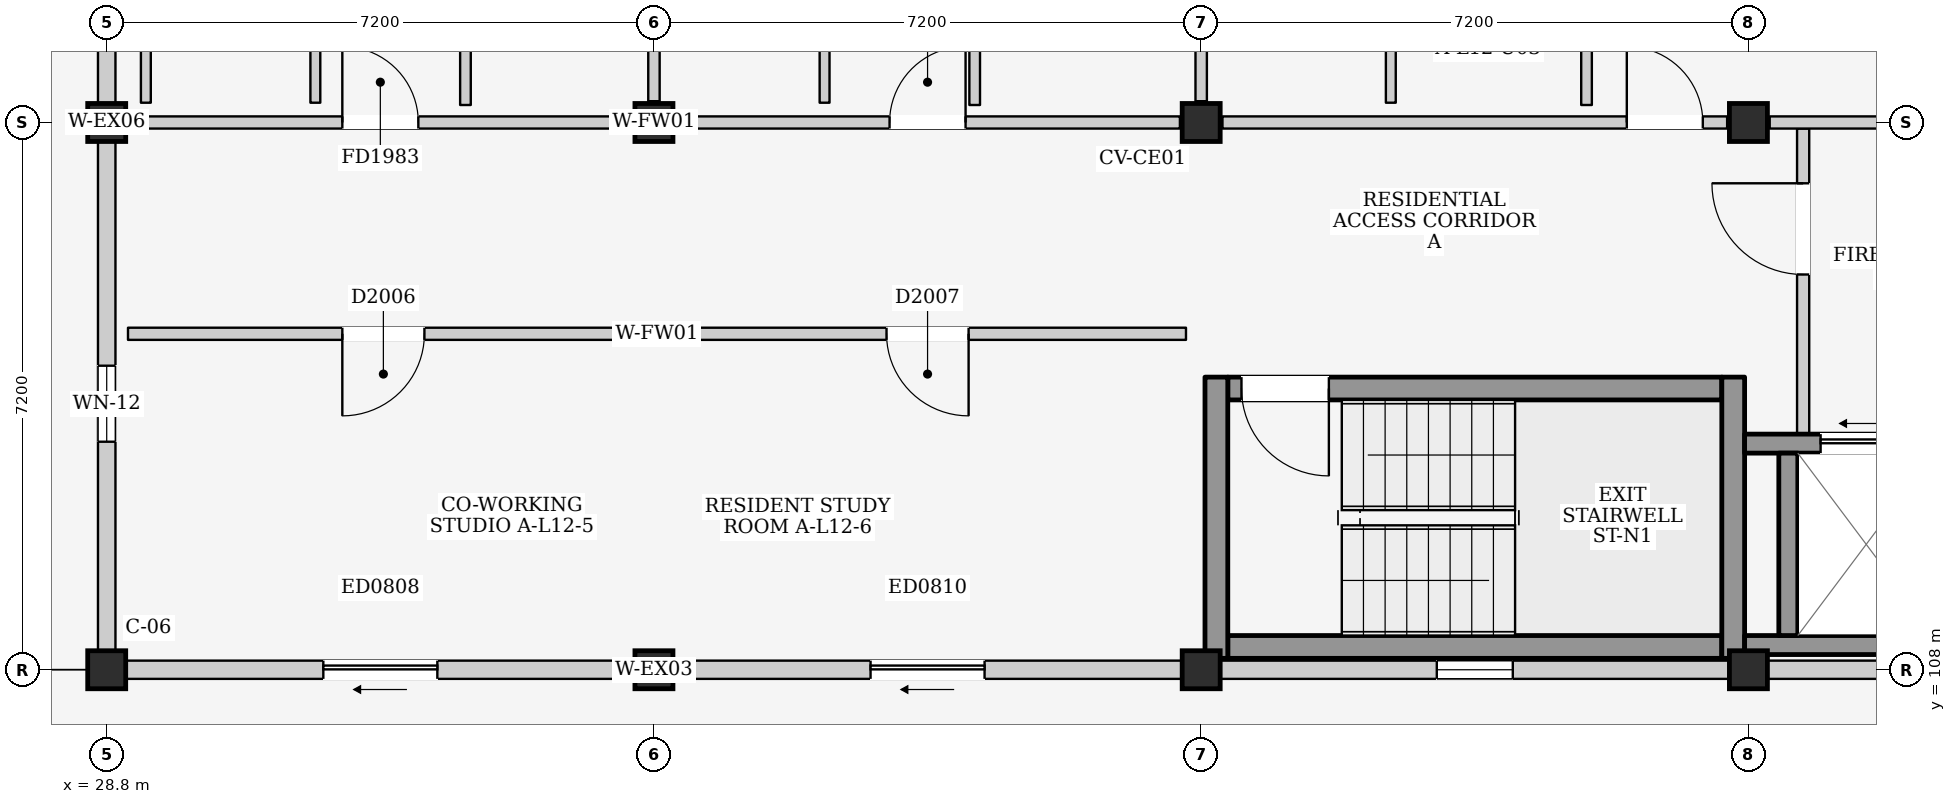
"""IFC4 building model, lengths in metres.
Left out: names, types, materials, properties, quantities, classifications, styles, units other than length and angle.
Written with IfcOpenShell. Run it as: python <this file> out.ifc"""

import sys

from ifc_helpers import new_model, si_unit, direction, frame, frame_2d, origin, origin_2d, place, context, subcontext, project, spatial, rectangle, extrude, element, fill, save


model = new_model("IFC4")
c1 = context("Model", 3, precision=1e-05, world=origin(), true_north=direction((0.0, 1.0)))
c2 = subcontext(c1, "Body", "Model", "MODEL_VIEW")
j1 = project(units=[si_unit("LENGTHUNIT", "METRE"), si_unit("PLANEANGLEUNIT", "RADIAN")], contexts=[c1])
p1 = place(None, origin())
s1 = spatial("IfcSite", under=j1, at=p1, CompositionType="ELEMENT")
p2 = place(p1, origin())
s2 = spatial("IfcBuilding", under=s1, at=p2, CompositionType="ELEMENT")
p3 = place(p2, frame((0.0, 0.0, 41.2)))
s3 = spatial("IfcBuildingStorey", under=s2, at=p3, CompositionType="ELEMENT", Elevation=41.2)
for number, where, z_axis, x_axis in (
    (1, (28.8, 108.0, 0.0), (0.0, 0.0, 1.0), (1.0, 0.0, 0.0)),
    (2, (28.8, 115.2, 0.0), (0.0, 0.0, 1.0), (1.0, 0.0, 0.0)),
    (3, (36.0, 108.0, 0.0), (0.0, 0.0, 1.0), (1.0, 0.0, 0.0)),
    (4, (36.0, 115.2, 0.0), (0.0, 0.0, 1.0), (1.0, 0.0, 0.0)),
    (5, (43.2, 108.0, 0.0), (0.0, 0.0, 1.0), (1.0, 0.0, 0.0)),
    (6, (43.2, 115.2, 0.0), (0.0, 0.0, 1.0), (1.0, 0.0, 0.0)),
    (7, (50.4, 108.0, 0.0), (0.0, 0.0, 1.0), (1.0, 0.0, 0.0)),
    (8, (50.4, 115.2, 0.0), (0.0, 0.0, 1.0), (1.0, 0.0, 0.0)),
):
    element("IfcColumn", number, at=place(p3, frame(where, z_axis=z_axis, x_axis=x_axis)), inside=s3, PredefinedType="COLUMN", context=c2, shape_type="SweptSolid", body=[
        extrude(rectangle(XDim=0.5, YDim=0.5, at=origin_2d()), origin(), (0.0, 0.0, 1.0), 3.2),
    ])
p4 = place(p3, frame((29.05, 108.0, 0.0), z_axis=(0.0, 0.0, 1.0), x_axis=(1.0, 0.0, 0.0)))
e9 = element("IfcWall", 9, at=p4, inside=s3, PredefinedType="ELEMENTEDWALL", context=c2, shape_type="SweptSolid", body=[
    extrude(rectangle(XDim=6.7, YDim=0.24, at=frame_2d((3.35, 0.0))), origin(), (0.0, 0.0, 1.0), 2.285),
])
p5 = place(p4, frame((2.6, 0.0, 0.0)))
e10 = element("IfcOpeningElement", 10, at=p5, cuts=e9, PredefinedType="OPENING", context=c2, shape_type="SweptSolid", body=[
    extrude(rectangle(XDim=1.5, YDim=2.12, at=frame_2d((0.75, 1.06))), frame((0.0, 0.135, 0.0), z_axis=(0.0, -1.0, 0.0), x_axis=(1.0, 0.0, 0.0)), (0.0, 0.0, 1.0), 0.27),
])
p6 = place(p3, frame((36.25, 108.0, 0.0), z_axis=(0.0, 0.0, 1.0), x_axis=(1.0, 0.0, 0.0)))
e11 = element("IfcWall", 11, at=p6, inside=s3, PredefinedType="ELEMENTEDWALL", context=c2, shape_type="SweptSolid", body=[
    extrude(rectangle(XDim=6.7, YDim=0.24, at=frame_2d((3.35, 0.0))), origin(), (0.0, 0.0, 1.0), 2.285),
])
p7 = place(p6, frame((2.6, 0.0, 0.0)))
e12 = element("IfcOpeningElement", 12, at=p7, cuts=e11, PredefinedType="OPENING", context=c2, shape_type="SweptSolid", body=[
    extrude(rectangle(XDim=1.5, YDim=2.12, at=frame_2d((0.75, 1.06))), frame((0.0, 0.135, 0.0), z_axis=(0.0, -1.0, 0.0), x_axis=(1.0, 0.0, 0.0)), (0.0, 0.0, 1.0), 0.27),
])
p8 = place(p3, frame((43.45, 108.0, 0.0), z_axis=(0.0, 0.0, 1.0), x_axis=(1.0, 0.0, 0.0)))
e13 = element("IfcWall", 13, at=p8, inside=s3, PredefinedType="ELEMENTEDWALL", context=c2, shape_type="SweptSolid", body=[
    extrude(rectangle(XDim=6.7, YDim=0.24, at=frame_2d((3.35, 0.0))), origin(), (0.0, 0.0, 1.0), 2.285),
])
p9 = place(p8, frame((2.85, 0.0, 1.2)))
e14 = element("IfcOpeningElement", 14, at=p9, cuts=e13, PredefinedType="OPENING", context=c2, shape_type="SweptSolid", body=[
    extrude(rectangle(XDim=1.0, YDim=0.9, at=frame_2d((0.5, 0.45))), frame((0.0, 0.135, 0.0), z_axis=(0.0, -1.0, 0.0), x_axis=(1.0, 0.0, 0.0)), (0.0, 0.0, 1.0), 0.27),
])
p10 = place(p3, frame((50.65, 108.0, 0.0), z_axis=(0.0, 0.0, 1.0), x_axis=(1.0, 0.0, 0.0)))
e15 = element("IfcWall", 15, at=p10, inside=s3, PredefinedType="ELEMENTEDWALL", context=c2, shape_type="SweptSolid", body=[
    extrude(rectangle(XDim=6.7, YDim=0.24, at=frame_2d((3.35, 0.0))), origin(), (0.0, 0.0, 1.0), 2.285),
])
p11 = place(p10, frame((2.85, 0.0, 1.2)))
e16 = element("IfcOpeningElement", 16, at=p11, cuts=e15, PredefinedType="OPENING", context=c2, shape_type="SweptSolid", body=[
    extrude(rectangle(XDim=1.0, YDim=0.9, at=frame_2d((0.5, 0.45))), frame((0.0, 0.135, 0.0), z_axis=(0.0, -1.0, 0.0), x_axis=(1.0, 0.0, 0.0)), (0.0, 0.0, 1.0), 0.27),
])
p12 = place(p3, frame((28.8, 108.25, 0.0), z_axis=(0.0, 0.0, 1.0), x_axis=(0.0, 1.0, 0.0)))
e17 = element("IfcWall", 17, at=p12, inside=s3, PredefinedType="ELEMENTEDWALL", context=c2, shape_type="SweptSolid", body=[
    extrude(rectangle(XDim=6.7, YDim=0.23, at=frame_2d((3.35, 0.0))), origin(), (0.0, 0.0, 1.0), 2.435),
])
p13 = place(p12, frame((2.75, 0.0, 1.1)))
e18 = element("IfcOpeningElement", 18, at=p13, cuts=e17, PredefinedType="OPENING", context=c2, shape_type="SweptSolid", body=[
    extrude(rectangle(XDim=1.0, YDim=0.9, at=frame_2d((0.5, 0.45))), frame((0.0, 0.13, 0.0), z_axis=(0.0, -1.0, 0.0), x_axis=(1.0, 0.0, 0.0)), (0.0, 0.0, 1.0), 0.26),
])
p14 = place(p3, frame((28.8, 115.45, 0.0), z_axis=(0.0, 0.0, 1.0), x_axis=(0.0, 1.0, 0.0)))
e19 = element("IfcWall", 19, at=p14, inside=s3, PredefinedType="ELEMENTEDWALL", context=c2, shape_type="SweptSolid", body=[
    extrude(rectangle(XDim=6.7, YDim=0.23, at=frame_2d((3.35, 0.0))), origin(), (0.0, 0.0, 1.0), 2.435),
])
p15 = place(p14, frame((3.6, 0.0, 0.0)))
e20 = element("IfcOpeningElement", 20, at=p15, cuts=e19, PredefinedType="OPENING", context=c2, shape_type="SweptSolid", body=[
    extrude(rectangle(XDim=1.08, YDim=2.12, at=frame_2d((0.54, 1.06))), frame((0.0, 0.13, 0.0), z_axis=(0.0, -1.0, 0.0), x_axis=(1.0, 0.0, 0.0)), (0.0, 0.0, 1.0), 0.26),
])
p16 = place(p3, frame((43.55, 108.3, 0.0), z_axis=(0.0, 0.0, 1.0), x_axis=(1.0, 0.0, 0.0)))
e21 = element("IfcWall", 21, at=p16, inside=s3, PredefinedType="SHEAR", context=c2, shape_type="SweptSolid", body=[
    extrude(rectangle(XDim=6.5, YDim=0.3, at=frame_2d((3.25, 0.0))), origin(), (0.0, 0.0, 1.0), 2.95),
])
p17 = place(p3, frame((43.55, 111.7, 0.0), z_axis=(0.0, 0.0, 1.0), x_axis=(1.0, 0.0, 0.0)))
e22 = element("IfcWall", 22, at=p17, inside=s3, PredefinedType="SHEAR", context=c2, shape_type="SweptSolid", body=[
    extrude(rectangle(XDim=6.5, YDim=0.3, at=frame_2d((3.25, 0.0))), origin(), (0.0, 0.0, 1.0), 2.95),
])
p18 = place(p17, frame((0.18, 0.0, 0.0)))
e23 = element("IfcOpeningElement", 23, at=p18, cuts=e22, PredefinedType="OPENING", context=c2, shape_type="SweptSolid", body=[
    extrude(rectangle(XDim=1.15, YDim=2.2, at=frame_2d((0.575, 1.1))), frame((0.0, 0.165, 0.0), z_axis=(0.0, -1.0, 0.0), x_axis=(1.0, 0.0, 0.0)), (0.0, 0.0, 1.0), 0.33),
])
for number, where, z_axis, x_axis in (
    (24, (43.4, 108.15, 0.0), (0.0, 0.0, 1.0), (0.0, 1.0, 0.0)),
    (25, (50.2, 108.15, 0.0), (0.0, 0.0, 1.0), (0.0, 1.0, 0.0)),
):
    element("IfcWall", number, at=place(p3, frame(where, z_axis=z_axis, x_axis=x_axis)), inside=s3, PredefinedType="SHEAR", context=c2, shape_type="SweptSolid", body=[
        extrude(rectangle(XDim=3.7, YDim=0.3, at=frame_2d((1.85, 0.0))), origin(), (0.0, 0.0, 1.0), 2.95),
    ])
p19 = place(p3, frame((51.12, 111.1, 0.0), z_axis=(0.0, 0.0, 1.0), x_axis=(0.0, 1.0, 0.0)))
e26 = element("IfcWall", 26, at=p19, inside=s3, PredefinedType="PARTITIONING", context=c2, shape_type="SweptSolid", body=[
    extrude(rectangle(XDim=4.02, YDim=0.16, at=frame_2d((2.01, 0.0))), origin(), (0.0, 0.0, 1.0), 2.95),
])
p20 = place(p19, frame((2.1, 0.0, 0.0)))
e27 = element("IfcOpeningElement", 27, at=p20, cuts=e26, PredefinedType="OPENING", context=c2, shape_type="SweptSolid", body=[
    extrude(rectangle(XDim=1.2, YDim=2.2, at=frame_2d((0.6, 1.1))), frame((0.0, 0.095, 0.0), z_axis=(0.0, -1.0, 0.0), x_axis=(1.0, 0.0, 0.0)), (0.0, 0.0, 1.0), 0.19),
])
p21 = place(p3, frame((50.35, 108.325, 0.0), z_axis=(0.0, 0.0, 1.0), x_axis=(1.0, 0.0, 0.0)))
e28 = element("IfcWall", 28, at=p21, inside=s3, PredefinedType="SHEAR", context=c2, shape_type="SweptSolid", body=[
    extrude(rectangle(XDim=2.675, YDim=0.25, at=frame_2d((1.337, 0.0))), origin(), (0.0, 0.0, 1.0), 2.95),
])
p22 = place(p3, frame((50.35, 110.975, 0.0), z_axis=(0.0, 0.0, 1.0), x_axis=(1.0, 0.0, 0.0)))
e29 = element("IfcWall", 29, at=p22, inside=s3, PredefinedType="SHEAR", context=c2, shape_type="SweptSolid", body=[
    extrude(rectangle(XDim=2.675, YDim=0.25, at=frame_2d((1.337, 0.0))), origin(), (0.0, 0.0, 1.0), 2.95),
])
p23 = place(p22, frame((1.0, 0.0, 0.0)))
e30 = element("IfcOpeningElement", 30, at=p23, cuts=e29, PredefinedType="OPENING", context=c2, shape_type="SweptSolid", body=[
    extrude(rectangle(XDim=1.2, YDim=2.25, at=frame_2d((0.6, 1.125))), frame((0.0, 0.14, 0.0), z_axis=(0.0, -1.0, 0.0), x_axis=(1.0, 0.0, 0.0)), (0.0, 0.0, 1.0), 0.28),
])
p24 = place(p3, frame((50.925, 108.45, 0.0), z_axis=(0.0, 0.0, 1.0), x_axis=(0.0, 1.0, 0.0)))
e31 = element("IfcWall", 31, at=p24, inside=s3, PredefinedType="SHEAR", context=c2, shape_type="SweptSolid", body=[
    extrude(rectangle(XDim=2.4, YDim=0.25, at=frame_2d((1.2, 0.0))), origin(), (0.0, 0.0, 1.0), 2.95),
])
p25 = place(p3, frame((29.08, 115.2, 0.0), z_axis=(0.0, 0.0, 1.0), x_axis=(1.0, 0.0, 0.0)))
e32 = element("IfcWall", 32, at=p25, inside=s3, PredefinedType="PARTITIONING", context=c2, shape_type="SweptSolid", body=[
    extrude(rectangle(XDim=6.64, YDim=0.16, at=frame_2d((3.32, 0.0))), origin(), (0.0, 0.0, 1.0), 2.285),
])
p26 = place(p25, frame((2.82, 0.0, 0.0)))
e33 = element("IfcOpeningElement", 33, at=p26, cuts=e32, PredefinedType="OPENING", context=c2, shape_type="SweptSolid", body=[
    extrude(rectangle(XDim=1.0, YDim=2.15, at=frame_2d((0.5, 1.075))), frame((0.0, 0.095, 0.0), z_axis=(0.0, -1.0, 0.0), x_axis=(1.0, 0.0, 0.0)), (0.0, 0.0, 1.0), 0.19),
])
p27 = place(p3, frame((36.0, 115.48, 0.0), z_axis=(0.0, 0.0, 1.0), x_axis=(0.0, 1.0, 0.0)))
e34 = element("IfcWall", 34, at=p27, inside=s3, PredefinedType="PARTITIONING", context=c2, shape_type="SweptSolid", body=[
    extrude(rectangle(XDim=6.64, YDim=0.15, at=frame_2d((3.32, 0.0))), origin(), (0.0, 0.0, 1.0), 2.435),
])
for number, where, z_axis, x_axis in (
    (35, (31.545, 115.46, 0.0), (0.0, 0.0, 1.0), (0.0, 1.0, 0.0)),
    (36, (29.315, 115.46, 0.0), (0.0, 0.0, 1.0), (0.0, 1.0, 0.0)),
):
    element("IfcWall", number, at=place(p3, frame(where, z_axis=z_axis, x_axis=x_axis)), inside=s3, PredefinedType="PARTITIONING", context=c2, shape_type="SweptSolid", body=[
        extrude(rectangle(XDim=2.13, YDim=0.13, at=frame_2d((1.065, 0.0))), origin(), (0.0, 0.0, 1.0), 2.95),
    ])
p28 = place(p3, frame((33.52, 115.43, 0.0), z_axis=(0.0, 0.0, 1.0), x_axis=(0.0, 1.0, 0.0)))
e37 = element("IfcWall", 37, at=p28, inside=s3, PredefinedType="PARTITIONING", context=c2, shape_type="SweptSolid", body=[
    extrude(rectangle(XDim=2.15, YDim=0.14, at=frame_2d((1.075, 0.0))), origin(), (0.0, 0.0, 1.0), 2.95),
])
p29 = place(p3, frame((36.28, 115.2, 0.0), z_axis=(0.0, 0.0, 1.0), x_axis=(1.0, 0.0, 0.0)))
e38 = element("IfcWall", 38, at=p29, inside=s3, PredefinedType="PARTITIONING", context=c2, shape_type="SweptSolid", body=[
    extrude(rectangle(XDim=6.64, YDim=0.16, at=frame_2d((3.32, 0.0))), origin(), (0.0, 0.0, 1.0), 2.285),
])
p30 = place(p29, frame((2.82, 0.0, 0.0)))
e39 = element("IfcOpeningElement", 39, at=p30, cuts=e38, PredefinedType="OPENING", context=c2, shape_type="SweptSolid", body=[
    extrude(rectangle(XDim=1.0, YDim=2.15, at=frame_2d((0.5, 1.075))), frame((0.0, 0.095, 0.0), z_axis=(0.0, -1.0, 0.0), x_axis=(1.0, 0.0, 0.0)), (0.0, 0.0, 1.0), 0.19),
])
p31 = place(p3, frame((43.2, 115.48, 0.0), z_axis=(0.0, 0.0, 1.0), x_axis=(0.0, 1.0, 0.0)))
e40 = element("IfcWall", 40, at=p31, inside=s3, PredefinedType="PARTITIONING", context=c2, shape_type="SweptSolid", body=[
    extrude(rectangle(XDim=6.64, YDim=0.15, at=frame_2d((3.32, 0.0))), origin(), (0.0, 0.0, 1.0), 2.435),
])
p32 = place(p3, frame((38.245, 115.46, 0.0), z_axis=(0.0, 0.0, 1.0), x_axis=(0.0, 1.0, 0.0)))
e41 = element("IfcWall", 41, at=p32, inside=s3, PredefinedType="PARTITIONING", context=c2, shape_type="SweptSolid", body=[
    extrude(rectangle(XDim=2.13, YDim=0.13, at=frame_2d((1.065, 0.0))), origin(), (0.0, 0.0, 1.0), 2.95),
])
p33 = place(p3, frame((40.22, 115.43, 0.0), z_axis=(0.0, 0.0, 1.0), x_axis=(0.0, 1.0, 0.0)))
e42 = element("IfcWall", 42, at=p33, inside=s3, PredefinedType="PARTITIONING", context=c2, shape_type="SweptSolid", body=[
    extrude(rectangle(XDim=2.15, YDim=0.14, at=frame_2d((1.075, 0.0))), origin(), (0.0, 0.0, 1.0), 2.95),
])
p34 = place(p3, frame((43.48, 115.2, 0.0), z_axis=(0.0, 0.0, 1.0), x_axis=(1.0, 0.0, 0.0)))
e43 = element("IfcWall", 43, at=p34, inside=s3, PredefinedType="PARTITIONING", context=c2, shape_type="SweptSolid", body=[
    extrude(rectangle(XDim=6.64, YDim=0.16, at=frame_2d((3.32, 0.0))), origin(), (0.0, 0.0, 1.0), 2.285),
])
p35 = place(p34, frame((5.32, 0.0, 0.0)))
e44 = element("IfcOpeningElement", 44, at=p35, cuts=e43, PredefinedType="OPENING", context=c2, shape_type="SweptSolid", body=[
    extrude(rectangle(XDim=1.0, YDim=2.15, at=frame_2d((0.5, 1.075))), frame((0.0, 0.095, 0.0), z_axis=(0.0, -1.0, 0.0), x_axis=(1.0, 0.0, 0.0)), (0.0, 0.0, 1.0), 0.19),
])
p36 = place(p3, frame((50.68, 115.2, 0.0), z_axis=(0.0, 0.0, 1.0), x_axis=(1.0, 0.0, 0.0)))
e45 = element("IfcWall", 45, at=p36, inside=s3, PredefinedType="PARTITIONING", context=c2, shape_type="SweptSolid", body=[
    extrude(rectangle(XDim=6.64, YDim=0.16, at=frame_2d((3.32, 0.0))), origin(), (0.0, 0.0, 1.0), 2.285),
])
p37 = place(p3, frame((45.695, 115.46, 0.0), z_axis=(0.0, 0.0, 1.0), x_axis=(0.0, 1.0, 0.0)))
e46 = element("IfcWall", 46, at=p37, inside=s3, PredefinedType="PARTITIONING", context=c2, shape_type="SweptSolid", body=[
    extrude(rectangle(XDim=3.04, YDim=0.13, at=frame_2d((1.52, 0.0))), origin(), (0.0, 0.0, 1.0), 2.95),
])
p38 = place(p3, frame((48.27, 115.43, 0.0), z_axis=(0.0, 0.0, 1.0), x_axis=(0.0, 1.0, 0.0)))
e47 = element("IfcWall", 47, at=p38, inside=s3, PredefinedType="PARTITIONING", context=c2, shape_type="SweptSolid", body=[
    extrude(rectangle(XDim=3.06, YDim=0.14, at=frame_2d((1.53, 0.0))), origin(), (0.0, 0.0, 1.0), 2.95),
])
p39 = place(p3, frame((29.08, 112.42, 0.0), z_axis=(0.0, 0.0, 1.0), x_axis=(1.0, 0.0, 0.0)))
e48 = element("IfcWall", 48, at=p39, inside=s3, PredefinedType="PARTITIONING", context=c2, shape_type="SweptSolid", body=[
    extrude(rectangle(XDim=6.72, YDim=0.16, at=frame_2d((3.36, 0.0))), origin(), (0.0, 0.0, 1.0), 2.95),
])
p40 = place(p39, frame((2.82, 0.0, 0.0)))
e49 = element("IfcOpeningElement", 49, at=p40, cuts=e48, PredefinedType="OPENING", context=c2, shape_type="SweptSolid", body=[
    extrude(rectangle(XDim=1.08, YDim=2.22, at=frame_2d((0.54, 1.11))), frame((0.0, 0.095, 0.0), z_axis=(0.0, -1.0, 0.0), x_axis=(1.0, 0.0, 0.0)), (0.0, 0.0, 1.0), 0.19),
])
p41 = place(p3, frame((36.2, 112.42, 0.0), z_axis=(0.0, 0.0, 1.0), x_axis=(1.0, 0.0, 0.0)))
e50 = element("IfcWall", 50, at=p41, inside=s3, PredefinedType="PARTITIONING", context=c2, shape_type="SweptSolid", body=[
    extrude(rectangle(XDim=6.8, YDim=0.16, at=frame_2d((3.4, 0.0))), origin(), (0.0, 0.0, 1.0), 2.95),
])
p42 = place(p41, frame((2.86, 0.0, 0.0)))
e51 = element("IfcOpeningElement", 51, at=p42, cuts=e50, PredefinedType="OPENING", context=c2, shape_type="SweptSolid", body=[
    extrude(rectangle(XDim=1.08, YDim=2.22, at=frame_2d((0.54, 1.11))), frame((0.0, 0.095, 0.0), z_axis=(0.0, -1.0, 0.0), x_axis=(1.0, 0.0, 0.0)), (0.0, 0.0, 1.0), 0.19),
])
p43 = place(p5, frame((1.5, 0.0, 0.0), z_axis=(0.0, 0.0, 1.0), x_axis=(-1.0, 0.0, 0.0)))
e52 = element("IfcDoor", 52, at=p43, inside=s3, OperationType="SLIDING_TO_LEFT", PredefinedType="DOOR", context=c2, shape_type="SweptSolid", body=[
    extrude(rectangle(XDim=1.5, YDim=2.12, at=frame_2d((0.75, 1.06))), frame((0.0, 0.025, 0.0), z_axis=(0.0, -1.0, 0.0), x_axis=(1.0, 0.0, 0.0)), (0.0, 0.0, 1.0), 0.05),
])
fill(e10, e52)
p44 = place(p7, frame((1.5, 0.0, 0.0), z_axis=(0.0, 0.0, 1.0), x_axis=(-1.0, 0.0, 0.0)))
e53 = element("IfcDoor", 53, at=p44, inside=s3, OperationType="SLIDING_TO_LEFT", PredefinedType="DOOR", context=c2, shape_type="SweptSolid", body=[
    extrude(rectangle(XDim=1.5, YDim=2.12, at=frame_2d((0.75, 1.06))), frame((0.0, 0.025, 0.0), z_axis=(0.0, -1.0, 0.0), x_axis=(1.0, 0.0, 0.0)), (0.0, 0.0, 1.0), 0.05),
])
fill(e12, e53)
p45 = place(p9, origin())
e54 = element("IfcWindow", 54, at=p45, inside=s3, PartitioningType="SINGLE_PANEL", PredefinedType="WINDOW", context=c2, shape_type="SweptSolid", body=[
    extrude(rectangle(XDim=1.0, YDim=0.9, at=frame_2d((0.5, 0.45))), frame((0.0, 0.03, 0.0), z_axis=(0.0, -1.0, 0.0), x_axis=(1.0, 0.0, 0.0)), (0.0, 0.0, 1.0), 0.06),
])
fill(e14, e54)
p46 = place(p13, origin())
e55 = element("IfcWindow", 55, at=p46, inside=s3, PartitioningType="SINGLE_PANEL", PredefinedType="WINDOW", context=c2, shape_type="SweptSolid", body=[
    extrude(rectangle(XDim=1.0, YDim=0.9, at=frame_2d((0.5, 0.45))), frame((0.0, 0.03, 0.0), z_axis=(0.0, -1.0, 0.0), x_axis=(1.0, 0.0, 0.0)), (0.0, 0.0, 1.0), 0.06),
])
fill(e18, e55)
p47 = place(p18, frame((1.15, 0.0, 0.0), z_axis=(0.0, 0.0, 1.0), x_axis=(-1.0, 0.0, 0.0)))
e56 = element("IfcDoor", 56, at=p47, inside=s3, OperationType="SINGLE_SWING_LEFT", PredefinedType="DOOR", context=c2, shape_type="SweptSolid", body=[
    extrude(rectangle(XDim=1.15, YDim=2.2, at=frame_2d((0.575, 1.1))), frame((0.0, 0.025, 0.0), z_axis=(0.0, -1.0, 0.0), x_axis=(1.0, 0.0, 0.0)), (0.0, 0.0, 1.0), 0.05),
])
fill(e23, e56)
p48 = place(p20, origin())
e57 = element("IfcDoor", 57, at=p48, inside=s3, OperationType="SINGLE_SWING_RIGHT", PredefinedType="DOOR", context=c2, shape_type="SweptSolid", body=[
    extrude(rectangle(XDim=1.2, YDim=2.2, at=frame_2d((0.6, 1.1))), frame((0.0, 0.025, 0.0), z_axis=(0.0, -1.0, 0.0), x_axis=(1.0, 0.0, 0.0)), (0.0, 0.0, 1.0), 0.05),
])
fill(e27, e57)
p49 = place(p23, origin())
e58 = element("IfcDoor", 58, at=p49, inside=s3, OperationType="SLIDING_TO_LEFT", PredefinedType="DOOR", context=c2, shape_type="SweptSolid", body=[
    extrude(rectangle(XDim=1.2, YDim=2.25, at=frame_2d((0.6, 1.125))), frame((0.0, 0.025, 0.0), z_axis=(0.0, -1.0, 0.0), x_axis=(1.0, 0.0, 0.0)), (0.0, 0.0, 1.0), 0.05),
])
fill(e30, e58)
p50 = place(p26, origin())
e59 = element("IfcDoor", 59, at=p50, inside=s3, OperationType="SINGLE_SWING_LEFT", PredefinedType="DOOR", context=c2, shape_type="SweptSolid", body=[
    extrude(rectangle(XDim=1.0, YDim=2.15, at=frame_2d((0.5, 1.075))), frame((0.0, 0.025, 0.0), z_axis=(0.0, -1.0, 0.0), x_axis=(1.0, 0.0, 0.0)), (0.0, 0.0, 1.0), 0.05),
])
fill(e33, e59)
p51 = place(p30, origin())
e60 = element("IfcDoor", 60, at=p51, inside=s3, OperationType="SINGLE_SWING_RIGHT", PredefinedType="DOOR", context=c2, shape_type="SweptSolid", body=[
    extrude(rectangle(XDim=1.0, YDim=2.15, at=frame_2d((0.5, 1.075))), frame((0.0, 0.025, 0.0), z_axis=(0.0, -1.0, 0.0), x_axis=(1.0, 0.0, 0.0)), (0.0, 0.0, 1.0), 0.05),
])
fill(e39, e60)
p52 = place(p35, origin())
e61 = element("IfcDoor", 61, at=p52, inside=s3, OperationType="SINGLE_SWING_LEFT", PredefinedType="DOOR", context=c2, shape_type="SweptSolid", body=[
    extrude(rectangle(XDim=1.0, YDim=2.15, at=frame_2d((0.5, 1.075))), frame((0.0, 0.025, 0.0), z_axis=(0.0, -1.0, 0.0), x_axis=(1.0, 0.0, 0.0)), (0.0, 0.0, 1.0), 0.05),
])
fill(e44, e61)
p53 = place(p40, frame((1.08, 0.0, 0.0), z_axis=(0.0, 0.0, 1.0), x_axis=(-1.0, 0.0, 0.0)))
e62 = element("IfcDoor", 62, at=p53, inside=s3, OperationType="SINGLE_SWING_RIGHT", PredefinedType="DOOR", context=c2, shape_type="SweptSolid", body=[
    extrude(rectangle(XDim=1.08, YDim=2.22, at=frame_2d((0.54, 1.11))), frame((0.0, 0.025, 0.0), z_axis=(0.0, -1.0, 0.0), x_axis=(1.0, 0.0, 0.0)), (0.0, 0.0, 1.0), 0.05),
])
fill(e49, e62)
p54 = place(p42, frame((1.08, 0.0, 0.0), z_axis=(0.0, 0.0, 1.0), x_axis=(-1.0, 0.0, 0.0)))
e63 = element("IfcDoor", 63, at=p54, inside=s3, OperationType="SINGLE_SWING_LEFT", PredefinedType="DOOR", context=c2, shape_type="SweptSolid", body=[
    extrude(rectangle(XDim=1.08, YDim=2.22, at=frame_2d((0.54, 1.11))), frame((0.0, 0.025, 0.0), z_axis=(0.0, -1.0, 0.0), x_axis=(1.0, 0.0, 0.0)), (0.0, 0.0, 1.0), 0.05),
])
fill(e51, e63)
save(model, sys.argv[1])
